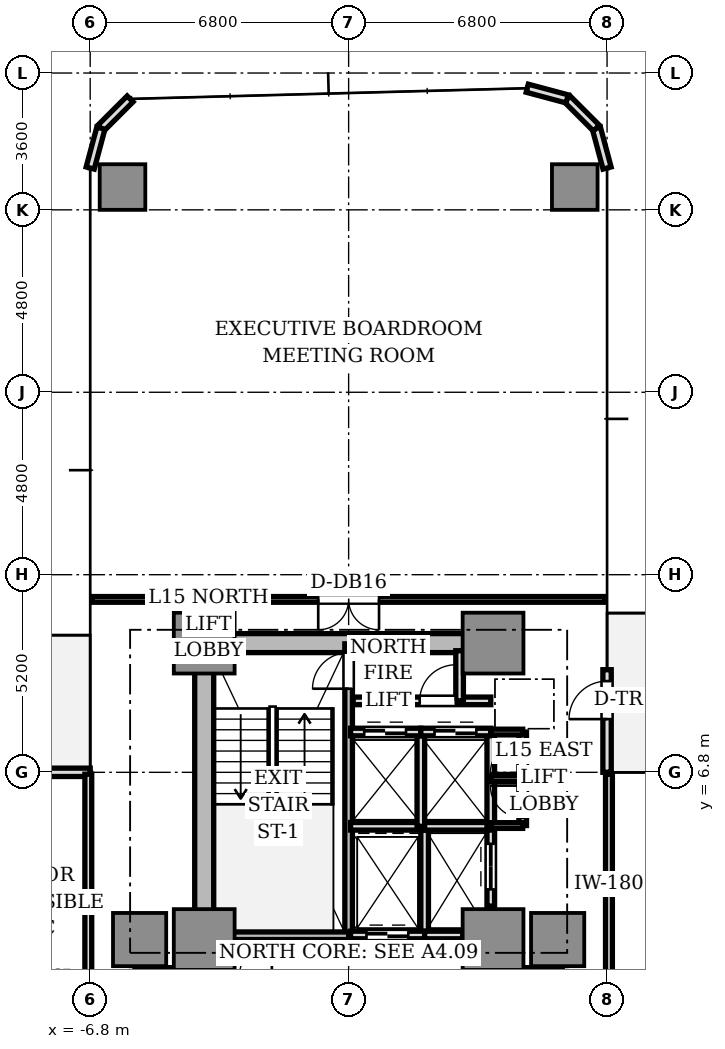
"""IFC4 building model, lengths in metres.
Left out: names, types, materials, properties, quantities, classifications, styles, units other than length and angle.
Written with IfcOpenShell. Run it as: python <this file> out.ifc"""

import sys

from ifc_helpers import new_model, si_unit, direction, frame, frame_2d, origin, origin_2d, place, context, subcontext, project, spatial, rectangle, extrude, source, transform, mapped, element, fill, save


model = new_model("IFC4")
c1 = context("Model", 3, precision=1e-05, world=origin(), true_north=direction((0.0, 1.0)))
c2 = subcontext(c1, "Body", "Model", "MODEL_VIEW")
j1 = project(units=[si_unit("LENGTHUNIT", "METRE"), si_unit("PLANEANGLEUNIT", "RADIAN")], contexts=[c1])
p1 = place(None, origin())
s1 = spatial("IfcSite", under=j1, at=p1, CompositionType="ELEMENT")
p2 = place(p1, origin())
s2 = spatial("IfcBuilding", under=s1, at=p2, CompositionType="ELEMENT")
p3 = place(p2, frame((0.0, 0.0, 57.75)))
s3 = spatial("IfcBuildingStorey", under=s2, at=p3, CompositionType="ELEMENT", Elevation=57.75)
p4 = place(p3, frame((-3.55, 10.2, 0.0), z_axis=(0.0, 0.0, 1.0), x_axis=(1.0, 0.0, 0.0)))
e1 = element("IfcWall", 1, at=p4, inside=s3, PredefinedType="SHEAR", context=c2, shape_type="SweptSolid", body=[
    extrude(rectangle(XDim=7.1, YDim=0.5, at=frame_2d((3.55, 0.0))), origin(), (0.0, 0.0, 1.0), 3.11),
])
p5 = place(p3, frame((-3.8, 2.85, 0.0), z_axis=(0.0, 0.0, 1.0), x_axis=(0.0, 1.0, 0.0)))
e2 = element("IfcWall", 2, at=p5, inside=s3, PredefinedType="SHEAR", context=c2, shape_type="SweptSolid", body=[
    extrude(rectangle(XDim=6.9, YDim=0.5, at=frame_2d((3.45, 0.0))), origin(), (0.0, 0.0, 1.0), 3.11),
])
m1 = source(origin(), c2, "Body", "SweptSolid", [
    extrude(rectangle(XDim=1.6, YDim=1.6, at=origin_2d()), origin(), (0.0, 0.0, 1.0), 3.11),
])
for number, where, z_axis, x_axis in (
    (3, (-3.8, 2.4, 0.0), (0.0, 0.0, 1.0), (1.0, 0.0, 0.0)),
    (4, (3.8, 2.4, 0.0), (0.0, 0.0, 1.0), (1.0, 0.0, 0.0)),
    (5, (-3.8, 10.2, 0.0), (0.0, 0.0, 1.0), (1.0, 0.0, 0.0)),
    (6, (3.8, 10.2, 0.0), (0.0, 0.0, 1.0), (1.0, 0.0, 0.0)),
):
    element("IfcColumn", number, at=place(p3, frame(where, z_axis=z_axis, x_axis=x_axis)), inside=s3, PredefinedType="COLUMN", context=c2, shape_type="MappedRepresentation", body=[
        mapped(m1, transform((0.0, 0.0, 0.0), scale=1.0)),
    ])
m2 = source(origin(), c2, "Body", "SweptSolid", [
    extrude(rectangle(XDim=1.4, YDim=1.4, at=origin_2d()), origin(), (0.0, 0.0, 1.0), 3.11),
])
for number, where, z_axis, x_axis in (
    (7, (5.5, 2.4, 0.0), (0.0, 0.0, 1.0), (1.0, 0.0, 0.0)),
    (8, (-5.5, 2.4, 0.0), (0.0, 0.0, 1.0), (1.0, 0.0, 0.0)),
):
    element("IfcColumn", number, at=place(p3, frame(where, z_axis=z_axis, x_axis=x_axis)), inside=s3, PredefinedType="COLUMN", context=c2, shape_type="MappedRepresentation", body=[
        mapped(m2, transform((0.0, 0.0, 0.0), scale=1.0)),
    ])
m3 = source(origin(), c2, "Body", "SweptSolid", [
    extrude(rectangle(XDim=1.2, YDim=1.2, at=origin_2d()), origin(), (0.0, 0.0, 1.0), 3.11),
])
for number, where, z_axis, x_axis in (
    (9, (5.95, 22.2, 0.0), (0.0, 0.0, 1.0), (1.0, 0.0, 0.0)),
    (10, (-5.95, 22.2, 0.0), (0.0, 0.0, 1.0), (1.0, 0.0, 0.0)),
):
    element("IfcColumn", number, at=place(p3, frame(where, z_axis=z_axis, x_axis=x_axis)), inside=s3, PredefinedType="COLUMN", context=c2, shape_type="MappedRepresentation", body=[
        mapped(m3, transform((0.0, 0.0, 0.0), scale=1.0)),
    ])
p6 = place(p3, frame((6.8, 6.8, 0.0), z_axis=(0.0, 0.0, 1.0), x_axis=(0.0, 1.0, 0.0)))
e11 = element("IfcWall", 11, at=p6, inside=s3, PredefinedType="STANDARD", context=c2, shape_type="SweptSolid", body=[
    extrude(rectangle(XDim=2.7, YDim=0.22, at=frame_2d((1.35, 0.0))), origin(), (0.0, 0.0, 1.0), 3.11),
])
p7 = place(p6, frame((1.4, 0.0, 0.0)))
e12 = element("IfcOpeningElement", 12, at=p7, cuts=e11, PredefinedType="OPENING", context=c2, shape_type="SweptSolid", body=[
    extrude(rectangle(XDim=1.0, YDim=2.2, at=frame_2d((0.5, 1.1))), frame((0.0, 0.12, 0.0), z_axis=(0.0, -1.0, 0.0), x_axis=(1.0, 0.0, 0.0)), (0.0, 0.0, 1.0), 0.24),
])
for number, where, z_axis, x_axis in (
    (13, (6.8, 22.7, 0.0), (0.0, 0.0, 1.0), (-0.259, 0.966, 0.0)),
    (14, (6.519, 23.75, 0.0), (0.0, 0.0, 1.0), (-0.707, 0.707, 0.0)),
    (15, (5.75, 24.519, 0.0), (0.0, 0.0, 1.0), (-0.966, 0.259, 0.0)),
    (16, (-5.75, 24.519, 0.0), (0.0, 0.0, 1.0), (-0.707, -0.707, 0.0)),
    (17, (-6.519, 23.75, 0.0), (0.0, 0.0, 1.0), (-0.259, -0.966, 0.0)),
):
    element("IfcWall", number, at=place(p3, frame(where, z_axis=z_axis, x_axis=x_axis)), inside=s3, PredefinedType="STANDARD", context=c2, shape_type="SweptSolid", body=[
        extrude(rectangle(XDim=1.087, YDim=0.22, at=frame_2d((0.543, 0.0))), origin(), (0.0, 0.0, 1.0), 3.11),
    ])
p8 = place(p3, frame((-6.8, 6.8, 0.0), z_axis=(0.0, 0.0, 1.0), x_axis=(-1.0, 0.0, 0.0)))
e18 = element("IfcWall", 18, at=p8, inside=s3, PredefinedType="STANDARD", context=c2, shape_type="SweptSolid", body=[
    extrude(rectangle(XDim=2.7, YDim=0.22, at=frame_2d((1.35, 0.0))), origin(), (0.0, 0.0, 1.0), 3.11),
])
p9 = place(p8, frame((1.4, 0.0, 0.0)))
e19 = element("IfcOpeningElement", 19, at=p9, cuts=e18, PredefinedType="OPENING", context=c2, shape_type="SweptSolid", body=[
    extrude(rectangle(XDim=1.0, YDim=2.2, at=frame_2d((0.5, 1.1))), frame((0.0, 0.12, 0.0), z_axis=(0.0, -1.0, 0.0), x_axis=(1.0, 0.0, 0.0)), (0.0, 0.0, 1.0), 0.24),
])
p10 = place(p3, frame((0.0, 2.5, 0.0), z_axis=(0.0, 0.0, 1.0), x_axis=(0.0, 1.0, 0.0)))
e20 = element("IfcWall", 20, at=p10, inside=s3, PredefinedType="SOLIDWALL", context=c2, shape_type="SweptSolid", body=[
    extrude(rectangle(XDim=7.68, YDim=0.2, at=frame_2d((3.84, 0.0))), origin(), (0.0, 0.0, 1.0), 3.11),
])
p11 = place(p10, frame((6.5, 0.0, 0.0)))
e21 = element("IfcOpeningElement", 21, at=p11, cuts=e20, PredefinedType="OPENING", context=c2, shape_type="SweptSolid", body=[
    extrude(rectangle(XDim=0.95, YDim=2.15, at=frame_2d((0.475, 1.075))), frame((0.0, 0.11, 0.0), z_axis=(0.0, -1.0, 0.0), x_axis=(1.0, 0.0, 0.0)), (0.0, 0.0, 1.0), 0.22),
])
p12 = place(p3, frame((-3.72, 2.5, 0.0), z_axis=(0.0, 0.0, 1.0), x_axis=(1.0, 0.0, 0.0)))
e22 = element("IfcWall", 22, at=p12, inside=s3, PredefinedType="SOLIDWALL", context=c2, shape_type="SweptSolid", body=[
    extrude(rectangle(XDim=3.72, YDim=0.2, at=frame_2d((1.86, 0.0))), origin(), (0.0, 0.0, 1.0), 3.11),
])
p13 = place(p3, frame((2.0, 2.5, 0.0), z_axis=(0.0, 0.0, 1.0), x_axis=(0.0, 1.0, 0.0)))
e23 = element("IfcWall", 23, at=p13, inside=s3, PredefinedType="SOLIDWALL", context=c2, shape_type="SweptSolid", body=[
    extrude(rectangle(XDim=2.78, YDim=0.2, at=frame_2d((1.39, 0.0))), origin(), (0.0, 0.0, 1.0), 2.66),
])
p14 = place(p3, frame((0.05, 2.52, 0.0), z_axis=(0.0, 0.0, 1.0), x_axis=(1.0, 0.0, 0.0)))
e24 = element("IfcWall", 24, at=p14, inside=s3, PredefinedType="SOLIDWALL", context=c2, shape_type="SweptSolid", body=[
    extrude(rectangle(XDim=1.95, YDim=0.2, at=frame_2d((0.975, 0.0))), origin(), (0.0, 0.0, 1.0), 2.66),
])
p15 = place(p14, frame((0.42, 0.0, 0.0)))
e25 = element("IfcOpeningElement", 25, at=p15, cuts=e24, PredefinedType="OPENING", context=c2, shape_type="SweptSolid", body=[
    extrude(rectangle(XDim=1.1, YDim=2.2, at=frame_2d((0.55, 1.1))), frame((0.0, 0.11, 0.0), z_axis=(0.0, -1.0, 0.0), x_axis=(1.0, 0.0, 0.0)), (0.0, 0.0, 1.0), 0.22),
])
p16 = place(p3, frame((2.0, 2.52, 0.0), z_axis=(0.0, 0.0, 1.0), x_axis=(1.0, 0.0, 0.0)))
e26 = element("IfcWall", 26, at=p16, inside=s3, PredefinedType="SOLIDWALL", context=c2, shape_type="SweptSolid", body=[
    extrude(rectangle(XDim=1.0, YDim=0.2, at=frame_2d((0.5, 0.0))), origin(), (0.0, 0.0, 1.0), 2.66),
])
p17 = place(p3, frame((3.74, 3.28, 0.0), z_axis=(0.0, 0.0, 1.0), x_axis=(0.0, 1.0, 0.0)))
e27 = element("IfcWall", 27, at=p17, inside=s3, PredefinedType="SOLIDWALL", context=c2, shape_type="SweptSolid", body=[
    extrude(rectangle(XDim=2.08, YDim=0.2, at=frame_2d((1.04, 0.0))), origin(), (0.0, 0.0, 1.0), 2.66),
])
p18 = place(p17, frame((0.44, 0.0, 0.0)))
e28 = element("IfcOpeningElement", 28, at=p18, cuts=e27, PredefinedType="OPENING", context=c2, shape_type="SweptSolid", body=[
    extrude(rectangle(XDim=1.2, YDim=2.2, at=frame_2d((0.6, 1.1))), frame((0.0, 0.11, 0.0), z_axis=(0.0, -1.0, 0.0), x_axis=(1.0, 0.0, 0.0)), (0.0, 0.0, 1.0), 0.22),
])
p19 = place(p3, frame((0.05, 5.38, 0.0), z_axis=(0.0, 0.0, 1.0), x_axis=(1.0, 0.0, 0.0)))
e29 = element("IfcWall", 29, at=p19, inside=s3, PredefinedType="SOLIDWALL", context=c2, shape_type="SweptSolid", body=[
    extrude(rectangle(XDim=3.69, YDim=0.2, at=frame_2d((1.845, 0.0))), origin(), (0.0, 0.0, 1.0), 2.66),
])
p20 = place(p3, frame((1.9, 5.38, 0.0), z_axis=(0.0, 0.0, 1.0), x_axis=(0.0, 1.0, 0.0)))
e30 = element("IfcWall", 30, at=p20, inside=s3, PredefinedType="SOLIDWALL", context=c2, shape_type="SweptSolid", body=[
    extrude(rectangle(XDim=2.48, YDim=0.2, at=frame_2d((1.24, 0.0))), origin(), (0.0, 0.0, 1.0), 2.66),
])
p21 = place(p3, frame((0.05, 7.86, 0.0), z_axis=(0.0, 0.0, 1.0), x_axis=(1.0, 0.0, 0.0)))
e31 = element("IfcWall", 31, at=p21, inside=s3, PredefinedType="SOLIDWALL", context=c2, shape_type="SweptSolid", body=[
    extrude(rectangle(XDim=1.85, YDim=0.2, at=frame_2d((0.925, 0.0))), origin(), (0.0, 0.0, 1.0), 2.66),
])
p22 = place(p21, frame((0.36, 0.0, 0.0)))
e32 = element("IfcOpeningElement", 32, at=p22, cuts=e31, PredefinedType="OPENING", context=c2, shape_type="SweptSolid", body=[
    extrude(rectangle(XDim=1.1, YDim=2.2, at=frame_2d((0.55, 1.1))), frame((0.0, 0.11, 0.0), z_axis=(0.0, -1.0, 0.0), x_axis=(1.0, 0.0, 0.0)), (0.0, 0.0, 1.0), 0.22),
])
p23 = place(p3, frame((3.74, 5.38, 0.0), z_axis=(0.0, 0.0, 1.0), x_axis=(0.0, 1.0, 0.0)))
e33 = element("IfcWall", 33, at=p23, inside=s3, PredefinedType="SOLIDWALL", context=c2, shape_type="SweptSolid", body=[
    extrude(rectangle(XDim=2.48, YDim=0.2, at=frame_2d((1.24, 0.0))), origin(), (0.0, 0.0, 1.0), 2.66),
])
p24 = place(p3, frame((1.9, 7.86, 0.0), z_axis=(0.0, 0.0, 1.0), x_axis=(1.0, 0.0, 0.0)))
e34 = element("IfcWall", 34, at=p24, inside=s3, PredefinedType="SOLIDWALL", context=c2, shape_type="SweptSolid", body=[
    extrude(rectangle(XDim=1.84, YDim=0.2, at=frame_2d((0.92, 0.0))), origin(), (0.0, 0.0, 1.0), 2.66),
])
p25 = place(p24, frame((0.36, 0.0, 0.0)))
e35 = element("IfcOpeningElement", 35, at=p25, cuts=e34, PredefinedType="OPENING", context=c2, shape_type="SweptSolid", body=[
    extrude(rectangle(XDim=1.1, YDim=2.2, at=frame_2d((0.55, 1.1))), frame((0.0, 0.11, 0.0), z_axis=(0.0, -1.0, 0.0), x_axis=(1.0, 0.0, 0.0)), (0.0, 0.0, 1.0), 0.22),
])
for number, where, z_axis, x_axis in (
    (36, (3.98, 1.56, 0.0), (0.0, 0.0, 1.0), (1.0, 0.0, 0.0)),
    (37, (-5.62, 1.56, 0.0), (0.0, 0.0, 1.0), (1.0, 0.0, 0.0)),
):
    element("IfcWall", number, at=place(p3, frame(where, z_axis=z_axis, x_axis=x_axis)), inside=s3, PredefinedType="SOLIDWALL", context=c2, shape_type="SweptSolid", body=[
        extrude(rectangle(XDim=1.64, YDim=0.2, at=frame_2d((0.82, 0.0))), origin(), (0.0, 0.0, 1.0), 2.66),
    ])
p26 = place(p3, frame((0.12, 8.68, 0.0), z_axis=(0.0, 0.0, 1.0), x_axis=(1.0, 0.0, 0.0)))
e38 = element("IfcWall", 38, at=p26, inside=s3, PredefinedType="SOLIDWALL", context=c2, shape_type="SweptSolid", body=[
    extrude(rectangle(XDim=3.62, YDim=0.2, at=frame_2d((1.81, 0.0))), origin(), (0.0, 0.0, 1.0), 2.66),
])
p27 = place(p26, frame((1.75, 0.0, 0.0)))
e39 = element("IfcOpeningElement", 39, at=p27, cuts=e38, PredefinedType="OPENING", context=c2, shape_type="SweptSolid", body=[
    extrude(rectangle(XDim=0.95, YDim=2.15, at=frame_2d((0.475, 1.075))), frame((0.0, 0.11, 0.0), z_axis=(0.0, -1.0, 0.0), x_axis=(1.0, 0.0, 0.0)), (0.0, 0.0, 1.0), 0.22),
])
p28 = place(p3, frame((2.92, 8.68, 0.0), z_axis=(0.0, 0.0, 1.0), x_axis=(0.0, 1.0, 0.0)))
e40 = element("IfcWall", 40, at=p28, inside=s3, PredefinedType="SOLIDWALL", context=c2, shape_type="SweptSolid", body=[
    extrude(rectangle(XDim=1.32, YDim=0.2, at=frame_2d((0.66, 0.0))), origin(), (0.0, 0.0, 1.0), 2.66),
])
p29 = place(p3, frame((4.58, 5.4, 0.0), z_axis=(0.0, 0.0, 1.0), x_axis=(0.0, 1.0, 0.0)))
e41 = element("IfcWall", 41, at=p29, inside=s3, PredefinedType="SOLIDWALL", context=c2, shape_type="SweptSolid", body=[
    extrude(rectangle(XDim=2.46, YDim=0.2, at=frame_2d((1.23, 0.0))), origin(), (0.0, 0.0, 1.0), 2.66),
])
p30 = place(p29, frame((0.2, 0.0, 0.0)))
e42 = element("IfcOpeningElement", 42, at=p30, cuts=e41, PredefinedType="OPENING", context=c2, shape_type="SweptSolid", body=[
    extrude(rectangle(XDim=0.85, YDim=2.1, at=frame_2d((0.425, 1.05))), frame((0.0, 0.11, 0.0), z_axis=(0.0, -1.0, 0.0), x_axis=(1.0, 0.0, 0.0)), (0.0, 0.0, 1.0), 0.22),
])
p31 = place(p29, frame((1.38, 0.0, 0.0)))
e43 = element("IfcOpeningElement", 43, at=p31, cuts=e41, PredefinedType="OPENING", context=c2, shape_type="SweptSolid", body=[
    extrude(rectangle(XDim=0.85, YDim=2.1, at=frame_2d((0.425, 1.05))), frame((0.0, 0.11, 0.0), z_axis=(0.0, -1.0, 0.0), x_axis=(1.0, 0.0, 0.0)), (0.0, 0.0, 1.0), 0.22),
])
for number, where, z_axis, x_axis in (
    (44, (3.74, 5.4, 0.0), (0.0, 0.0, 1.0), (1.0, 0.0, 0.0)),
    (45, (3.74, 7.86, 0.0), (0.0, 0.0, 1.0), (1.0, 0.0, 0.0)),
    (46, (3.74, 6.63, 0.0), (0.0, 0.0, 1.0), (1.0, 0.0, 0.0)),
):
    element("IfcWall", number, at=place(p3, frame(where, z_axis=z_axis, x_axis=x_axis)), inside=s3, PredefinedType="PARTITIONING", context=c2, shape_type="SweptSolid", body=[
        extrude(rectangle(XDim=0.84, YDim=0.15, at=frame_2d((0.42, 0.0))), origin(), (0.0, 0.0, 1.0), 2.66),
    ])
p32 = place(p3, frame((6.85, 0.95, 0.0), z_axis=(0.0, 0.0, 1.0), x_axis=(0.0, 1.0, 0.0)))
e47 = element("IfcWall", 47, at=p32, inside=s3, PredefinedType="PARTITIONING", context=c2, shape_type="SweptSolid", body=[
    extrude(rectangle(XDim=5.8, YDim=0.18, at=frame_2d((2.9, 0.0))), origin(), (0.0, 0.0, 1.0), 2.66),
])
p33 = place(p3, frame((6.75, 11.35, 0.0), z_axis=(0.0, 0.0, 1.0), x_axis=(-1.0, 0.0, 0.0)))
e48 = element("IfcWall", 48, at=p33, inside=s3, PredefinedType="PARTITIONING", context=c2, shape_type="SweptSolid", body=[
    extrude(rectangle(XDim=13.5, YDim=0.15, at=frame_2d((6.75, 0.0))), origin(), (0.0, 0.0, 1.0), 2.66),
])
p34 = place(p33, frame((5.95, 0.0, 0.0)))
e49 = element("IfcOpeningElement", 49, at=p34, cuts=e48, PredefinedType="OPENING", context=c2, shape_type="SweptSolid", body=[
    extrude(rectangle(XDim=1.6, YDim=2.25, at=frame_2d((0.8, 1.125))), frame((0.0, 0.085, 0.0), z_axis=(0.0, -1.0, 0.0), x_axis=(1.0, 0.0, 0.0)), (0.0, 0.0, 1.0), 0.17),
])
p35 = place(p3, frame((-6.85, 6.75, 0.0), z_axis=(0.0, 0.0, 1.0), x_axis=(0.0, -1.0, 0.0)))
e50 = element("IfcWall", 50, at=p35, inside=s3, PredefinedType="PARTITIONING", context=c2, shape_type="SweptSolid", body=[
    extrude(rectangle(XDim=5.8, YDim=0.18, at=frame_2d((2.9, 0.0))), origin(), (0.0, 0.0, 1.0), 2.66),
])
m4 = source(origin(), c2, "Body", "SweptSolid", [
    extrude(rectangle(XDim=1.0, YDim=0.05, at=origin_2d()), origin(), (0.0, 0.0, 1.0), 2.2),
])
p36 = place(p7, frame((0.5, 0.0, 0.0)))
e51 = element("IfcDoor", 51, at=p36, inside=s3, OperationType="SINGLE_SWING_LEFT", PredefinedType="DOOR", context=c2, shape_type="MappedRepresentation", body=[
    mapped(m4, transform((0.0, 0.0, 0.0), scale=1.0)),
])
fill(e12, e51)
m5 = source(origin(), c2, "Body", "SweptSolid", [
    extrude(rectangle(XDim=1.1, YDim=0.05, at=origin_2d()), origin(), (0.0, 0.0, 1.0), 2.2),
])
p37 = place(p15, frame((0.55, 0.0, 0.0)))
e52 = element("IfcDoor", 52, at=p37, inside=s3, OperationType="DOUBLE_DOOR_SLIDING", PredefinedType="DOOR", context=c2, shape_type="MappedRepresentation", body=[
    mapped(m5, transform((0.0, 0.0, 0.0), scale=1.0)),
])
fill(e25, e52)
m6 = source(origin(), c2, "Body", "SweptSolid", [
    extrude(rectangle(XDim=1.2, YDim=0.05, at=origin_2d()), origin(), (0.0, 0.0, 1.0), 2.2),
])
p38 = place(p18, frame((0.6, 0.0, 0.0)))
e53 = element("IfcDoor", 53, at=p38, inside=s3, OperationType="DOUBLE_DOOR_SLIDING", PredefinedType="DOOR", context=c2, shape_type="MappedRepresentation", body=[
    mapped(m6, transform((0.0, 0.0, 0.0), scale=1.0)),
])
fill(e28, e53)
p39 = place(p22, frame((0.55, 0.0, 0.0)))
e54 = element("IfcDoor", 54, at=p39, inside=s3, OperationType="DOUBLE_DOOR_SLIDING", PredefinedType="DOOR", context=c2, shape_type="MappedRepresentation", body=[
    mapped(m5, transform((0.0, 0.0, 0.0), scale=1.0)),
])
fill(e32, e54)
p40 = place(p25, frame((0.55, 0.0, 0.0)))
e55 = element("IfcDoor", 55, at=p40, inside=s3, OperationType="DOUBLE_DOOR_SLIDING", PredefinedType="DOOR", context=c2, shape_type="MappedRepresentation", body=[
    mapped(m5, transform((0.0, 0.0, 0.0), scale=1.0)),
])
fill(e35, e55)
m7 = source(origin(), c2, "Body", "SweptSolid", [
    extrude(rectangle(XDim=0.95, YDim=0.05, at=origin_2d()), origin(), (0.0, 0.0, 1.0), 2.15),
])
p41 = place(p11, frame((0.475, 0.0, 0.0)))
e56 = element("IfcDoor", 56, at=p41, inside=s3, OperationType="SINGLE_SWING_LEFT", PredefinedType="DOOR", context=c2, shape_type="MappedRepresentation", body=[
    mapped(m7, transform((0.0, 0.0, 0.0), scale=1.0)),
])
fill(e21, e56)
p42 = place(p27, frame((0.475, 0.0, 0.0)))
e57 = element("IfcDoor", 57, at=p42, inside=s3, OperationType="SINGLE_SWING_RIGHT", PredefinedType="DOOR", context=c2, shape_type="MappedRepresentation", body=[
    mapped(m7, transform((0.0, 0.0, 0.0), scale=1.0)),
])
fill(e39, e57)
m8 = source(origin(), c2, "Body", "SweptSolid", [
    extrude(rectangle(XDim=0.85, YDim=0.05, at=origin_2d()), origin(), (0.0, 0.0, 1.0), 2.1),
])
p43 = place(p30, frame((0.425, 0.0, 0.0)))
e58 = element("IfcDoor", 58, at=p43, inside=s3, OperationType="SINGLE_SWING_RIGHT", PredefinedType="DOOR", context=c2, shape_type="MappedRepresentation", body=[
    mapped(m8, transform((0.0, 0.0, 0.0), scale=1.0)),
])
fill(e42, e58)
p44 = place(p31, frame((0.425, 0.0, 0.0)))
e59 = element("IfcDoor", 59, at=p44, inside=s3, OperationType="SINGLE_SWING_LEFT", PredefinedType="DOOR", context=c2, shape_type="MappedRepresentation", body=[
    mapped(m8, transform((0.0, 0.0, 0.0), scale=1.0)),
])
fill(e43, e59)
m9 = source(origin(), c2, "Body", "SweptSolid", [
    extrude(rectangle(XDim=1.6, YDim=0.05, at=origin_2d()), origin(), (0.0, 0.0, 1.0), 2.25),
])
p45 = place(p34, frame((0.8, 0.0, 0.0)))
e60 = element("IfcDoor", 60, at=p45, inside=s3, OperationType="DOUBLE_DOOR_SINGLE_SWING", PredefinedType="DOOR", context=c2, shape_type="MappedRepresentation", body=[
    mapped(m9, transform((0.0, 0.0, 0.0), scale=1.0)),
])
fill(e49, e60)
save(model, sys.argv[1])
